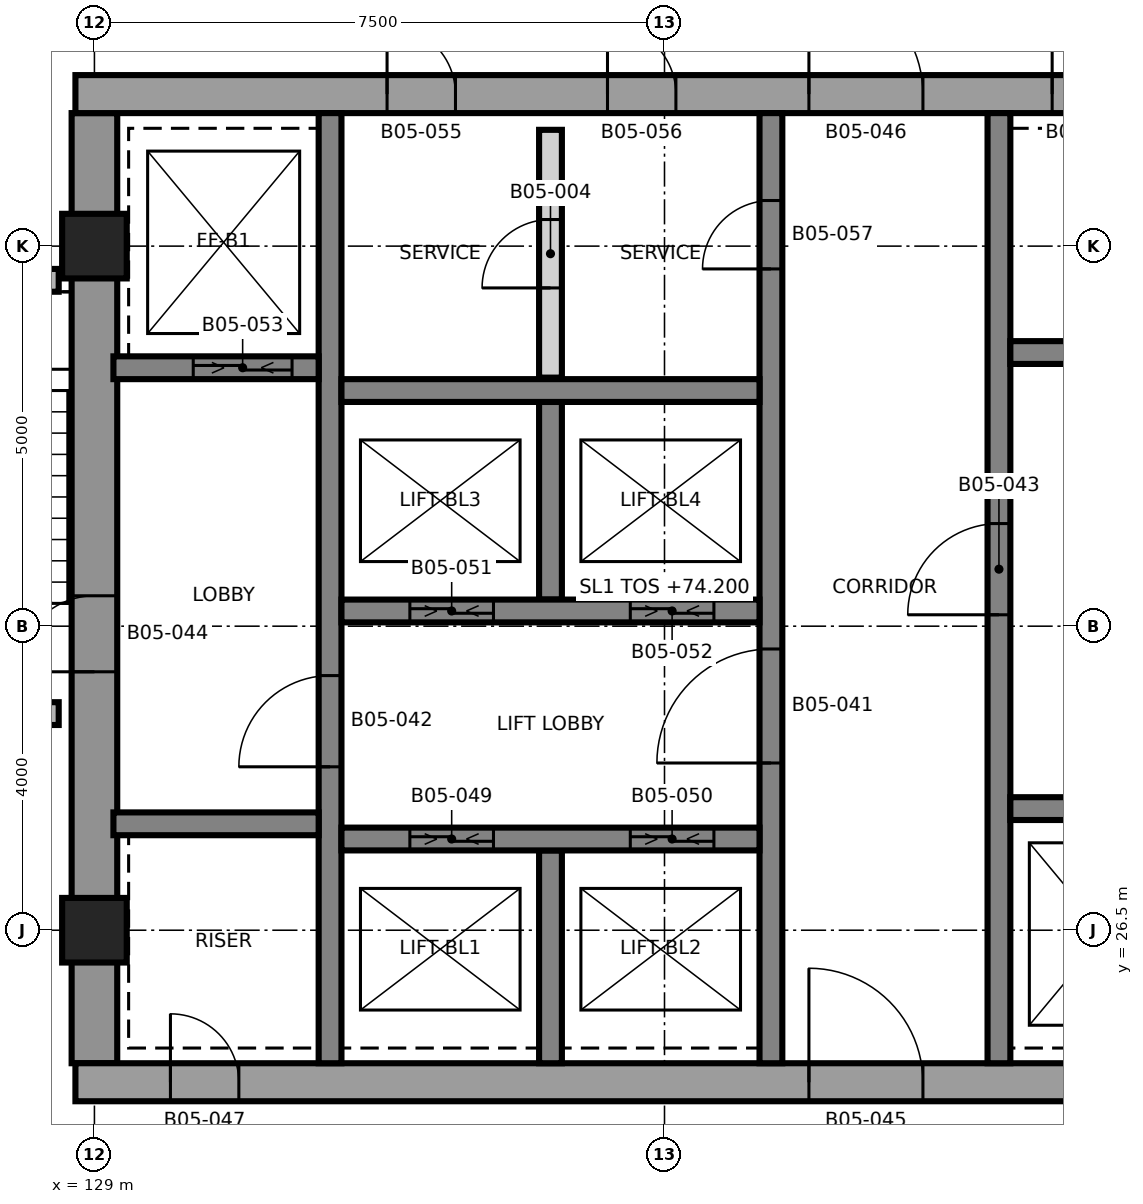
"""IFC4 building model, lengths in metres.
Left out: names, types, materials, properties, quantities, classifications, styles, units other than length and angle.
Written with IfcOpenShell. Run it as: python <this file> out.ifc"""

import sys

from ifc_helpers import new_model, si_unit, direction, frame, frame_2d, origin, origin_2d, place, context, subcontext, project, spatial, rectangle, extrude, element, fill, save


model = new_model("IFC4")
c1 = context("Model", 3, precision=1e-05, world=origin(), true_north=direction((0.0, 1.0)))
c2 = subcontext(c1, "Body", "Model", "MODEL_VIEW")
j1 = project(units=[si_unit("LENGTHUNIT", "METRE"), si_unit("PLANEANGLEUNIT", "RADIAN")], contexts=[c1])
p1 = place(None, origin())
s1 = spatial("IfcSite", under=j1, at=p1, CompositionType="ELEMENT")
p2 = place(p1, origin())
s2 = spatial("IfcBuilding", under=s1, at=p2, CompositionType="ELEMENT")
p3 = place(p2, frame((0.0, 0.0, 74.2)))
s3 = spatial("IfcBuildingStorey", under=s2, at=p3, CompositionType="ELEMENT", Elevation=74.2)
p4 = place(p3, frame((129.0, 24.75, 0.0), z_axis=(0.0, 0.0, 1.0), x_axis=(0.0, 1.0, 0.0)))
e1 = element("IfcWall", 1, at=p4, inside=s3, PredefinedType="SHEAR", context=c2, shape_type="SweptSolid", body=[
    extrude(rectangle(XDim=12.5, YDim=0.6, at=frame_2d((6.25, 0.0))), origin(), (0.0, 0.0, 1.0), 3.7),
])
p5 = place(p4, frame((5.15, 0.0, 0.0)))
e2 = element("IfcOpeningElement", 2, at=p5, cuts=e1, PredefinedType="OPENING", context=c2, shape_type="SweptSolid", body=[
    extrude(rectangle(XDim=1.0, YDim=2.1, at=frame_2d((0.5, 1.05))), frame((0.0, 0.31, 0.0), z_axis=(0.0, -1.0, 0.0), x_axis=(1.0, 0.0, 0.0)), (0.0, 0.0, 1.0), 0.62),
])
p6 = place(p3, frame((128.75, 24.5, 0.0), z_axis=(0.0, 0.0, 1.0), x_axis=(1.0, 0.0, 0.0)))
e3 = element("IfcWall", 3, at=p6, inside=s3, PredefinedType="SHEAR", context=c2, shape_type="SweptSolid", body=[
    extrude(rectangle(XDim=15.0, YDim=0.5, at=frame_2d((7.5, 0.0))), origin(), (0.0, 0.0, 1.0), 3.7),
])
p7 = place(p6, frame((9.65, 0.0, 0.0)))
e4 = element("IfcOpeningElement", 4, at=p7, cuts=e3, PredefinedType="OPENING", context=c2, shape_type="SweptSolid", body=[
    extrude(rectangle(XDim=1.5, YDim=2.1, at=frame_2d((0.75, 1.05))), frame((0.0, 0.26, 0.0), z_axis=(0.0, -1.0, 0.0), x_axis=(1.0, 0.0, 0.0)), (0.0, 0.0, 1.0), 0.52),
])
p8 = place(p6, frame((1.25, 0.0, 0.0)))
e5 = element("IfcOpeningElement", 5, at=p8, cuts=e3, PredefinedType="OPENING", context=c2, shape_type="SweptSolid", body=[
    extrude(rectangle(XDim=0.9, YDim=2.1, at=frame_2d((0.45, 1.05))), frame((0.0, 0.26, 0.0), z_axis=(0.0, -1.0, 0.0), x_axis=(1.0, 0.0, 0.0)), (0.0, 0.0, 1.0), 0.52),
])
p9 = place(p3, frame((128.75, 37.5, 0.0), z_axis=(0.0, 0.0, 1.0), x_axis=(1.0, 0.0, 0.0)))
e6 = element("IfcWall", 6, at=p9, inside=s3, PredefinedType="SHEAR", context=c2, shape_type="SweptSolid", body=[
    extrude(rectangle(XDim=15.0, YDim=0.5, at=frame_2d((7.5, 0.0))), origin(), (0.0, 0.0, 1.0), 3.7),
])
p10 = place(p9, frame((9.65, 0.0, 0.0)))
e7 = element("IfcOpeningElement", 7, at=p10, cuts=e6, PredefinedType="OPENING", context=c2, shape_type="SweptSolid", body=[
    extrude(rectangle(XDim=1.5, YDim=2.1, at=frame_2d((0.75, 1.05))), frame((0.0, 0.26, 0.0), z_axis=(0.0, -1.0, 0.0), x_axis=(1.0, 0.0, 0.0)), (0.0, 0.0, 1.0), 0.52),
])
p11 = place(p9, frame((12.85, 0.0, 0.0)))
e8 = element("IfcOpeningElement", 8, at=p11, cuts=e6, PredefinedType="OPENING", context=c2, shape_type="SweptSolid", body=[
    extrude(rectangle(XDim=0.9, YDim=2.1, at=frame_2d((0.45, 1.05))), frame((0.0, 0.26, 0.0), z_axis=(0.0, -1.0, 0.0), x_axis=(1.0, 0.0, 0.0)), (0.0, 0.0, 1.0), 0.52),
])
p12 = place(p9, frame((4.1, 0.0, 0.0)))
e9 = element("IfcOpeningElement", 9, at=p12, cuts=e6, PredefinedType="OPENING", context=c2, shape_type="SweptSolid", body=[
    extrude(rectangle(XDim=0.9, YDim=2.1, at=frame_2d((0.45, 1.05))), frame((0.0, 0.26, 0.0), z_axis=(0.0, -1.0, 0.0), x_axis=(1.0, 0.0, 0.0)), (0.0, 0.0, 1.0), 0.52),
])
p13 = place(p9, frame((7.0, 0.0, 0.0)))
e10 = element("IfcOpeningElement", 10, at=p13, cuts=e6, PredefinedType="OPENING", context=c2, shape_type="SweptSolid", body=[
    extrude(rectangle(XDim=0.9, YDim=2.1, at=frame_2d((0.45, 1.05))), frame((0.0, 0.26, 0.0), z_axis=(0.0, -1.0, 0.0), x_axis=(1.0, 0.0, 0.0)), (0.0, 0.0, 1.0), 0.52),
])
p14 = place(p3, frame((132.1, 24.75, 0.0), z_axis=(0.0, 0.0, 1.0), x_axis=(0.0, 1.0, 0.0)))
e11 = element("IfcWall", 11, at=p14, inside=s3, PredefinedType="SHEAR", context=c2, shape_type="SweptSolid", body=[
    extrude(rectangle(XDim=12.5, YDim=0.3, at=frame_2d((6.25, 0.0))), origin(), (0.0, 0.0, 1.0), 3.7),
])
p15 = place(p14, frame((3.9, 0.0, 0.0)))
e12 = element("IfcOpeningElement", 12, at=p15, cuts=e11, PredefinedType="OPENING", context=c2, shape_type="SweptSolid", body=[
    extrude(rectangle(XDim=1.2, YDim=2.1, at=frame_2d((0.6, 1.05))), frame((0.0, 0.16, 0.0), z_axis=(0.0, -1.0, 0.0), x_axis=(1.0, 0.0, 0.0)), (0.0, 0.0, 1.0), 0.32),
])
p16 = place(p3, frame((137.9, 24.75, 0.0), z_axis=(0.0, 0.0, 1.0), x_axis=(0.0, 1.0, 0.0)))
e13 = element("IfcWall", 13, at=p16, inside=s3, PredefinedType="SHEAR", context=c2, shape_type="SweptSolid", body=[
    extrude(rectangle(XDim=12.5, YDim=0.3, at=frame_2d((6.25, 0.0))), origin(), (0.0, 0.0, 1.0), 3.7),
])
p17 = place(p16, frame((3.95, 0.0, 0.0)))
e14 = element("IfcOpeningElement", 14, at=p17, cuts=e13, PredefinedType="OPENING", context=c2, shape_type="SweptSolid", body=[
    extrude(rectangle(XDim=1.5, YDim=2.1, at=frame_2d((0.75, 1.05))), frame((0.0, 0.16, 0.0), z_axis=(0.0, -1.0, 0.0), x_axis=(1.0, 0.0, 0.0)), (0.0, 0.0, 1.0), 0.32),
])
p18 = place(p16, frame((10.45, 0.0, 0.0)))
e15 = element("IfcOpeningElement", 15, at=p18, cuts=e13, PredefinedType="OPENING", context=c2, shape_type="SweptSolid", body=[
    extrude(rectangle(XDim=0.9, YDim=2.1, at=frame_2d((0.45, 1.05))), frame((0.0, 0.16, 0.0), z_axis=(0.0, -1.0, 0.0), x_axis=(1.0, 0.0, 0.0)), (0.0, 0.0, 1.0), 0.32),
])
p19 = place(p3, frame((140.9, 24.75, 0.0), z_axis=(0.0, 0.0, 1.0), x_axis=(0.0, 1.0, 0.0)))
e16 = element("IfcWall", 16, at=p19, inside=s3, PredefinedType="SHEAR", context=c2, shape_type="SweptSolid", body=[
    extrude(rectangle(XDim=12.5, YDim=0.3, at=frame_2d((6.25, 0.0))), origin(), (0.0, 0.0, 1.0), 3.7),
])
p20 = place(p19, frame((5.9, 0.0, 0.0)))
e17 = element("IfcOpeningElement", 17, at=p20, cuts=e16, PredefinedType="OPENING", context=c2, shape_type="SweptSolid", body=[
    extrude(rectangle(XDim=1.2, YDim=2.1, at=frame_2d((0.6, 1.05))), frame((0.0, 0.16, 0.0), z_axis=(0.0, -1.0, 0.0), x_axis=(1.0, 0.0, 0.0)), (0.0, 0.0, 1.0), 0.32),
])
p21 = place(p3, frame((135.0, 24.75, 0.0), z_axis=(0.0, 0.0, 1.0), x_axis=(0.0, 1.0, 0.0)))
e18 = element("IfcWall", 18, at=p21, inside=s3, PredefinedType="SHEAR", context=c2, shape_type="SweptSolid", body=[
    extrude(rectangle(XDim=2.8, YDim=0.3, at=frame_2d((1.4, 0.0))), origin(), (0.0, 0.0, 1.0), 3.7),
])
p22 = place(p3, frame((135.0, 30.85, 0.0), z_axis=(0.0, 0.0, 1.0), x_axis=(0.0, 1.0, 0.0)))
e19 = element("IfcWall", 19, at=p22, inside=s3, PredefinedType="SHEAR", context=c2, shape_type="SweptSolid", body=[
    extrude(rectangle(XDim=2.6, YDim=0.3, at=frame_2d((1.3, 0.0))), origin(), (0.0, 0.0, 1.0), 3.7),
])
p23 = place(p3, frame((132.25, 27.7, 0.0), z_axis=(0.0, 0.0, 1.0), x_axis=(1.0, 0.0, 0.0)))
e20 = element("IfcWall", 20, at=p23, inside=s3, PredefinedType="SHEAR", context=c2, shape_type="SweptSolid", body=[
    extrude(rectangle(XDim=5.5, YDim=0.3, at=frame_2d((2.75, 0.0))), origin(), (0.0, 0.0, 1.0), 3.7),
])
p24 = place(p23, frame((0.9, 0.0, 0.0)))
e21 = element("IfcOpeningElement", 21, at=p24, cuts=e20, PredefinedType="OPENING", context=c2, shape_type="SweptSolid", body=[
    extrude(rectangle(XDim=1.1, YDim=2.4, at=frame_2d((0.55, 1.2))), frame((0.0, 0.16, 0.0), z_axis=(0.0, -1.0, 0.0), x_axis=(1.0, 0.0, 0.0)), (0.0, 0.0, 1.0), 0.32),
])
p25 = place(p23, frame((3.8, 0.0, 0.0)))
e22 = element("IfcOpeningElement", 22, at=p25, cuts=e20, PredefinedType="OPENING", context=c2, shape_type="SweptSolid", body=[
    extrude(rectangle(XDim=1.1, YDim=2.4, at=frame_2d((0.55, 1.2))), frame((0.0, 0.16, 0.0), z_axis=(0.0, -1.0, 0.0), x_axis=(1.0, 0.0, 0.0)), (0.0, 0.0, 1.0), 0.32),
])
p26 = place(p3, frame((132.25, 30.7, 0.0), z_axis=(0.0, 0.0, 1.0), x_axis=(1.0, 0.0, 0.0)))
e23 = element("IfcWall", 23, at=p26, inside=s3, PredefinedType="SHEAR", context=c2, shape_type="SweptSolid", body=[
    extrude(rectangle(XDim=5.5, YDim=0.3, at=frame_2d((2.75, 0.0))), origin(), (0.0, 0.0, 1.0), 3.7),
])
p27 = place(p26, frame((0.9, 0.0, 0.0)))
e24 = element("IfcOpeningElement", 24, at=p27, cuts=e23, PredefinedType="OPENING", context=c2, shape_type="SweptSolid", body=[
    extrude(rectangle(XDim=1.1, YDim=2.4, at=frame_2d((0.55, 1.2))), frame((0.0, 0.16, 0.0), z_axis=(0.0, -1.0, 0.0), x_axis=(1.0, 0.0, 0.0)), (0.0, 0.0, 1.0), 0.32),
])
p28 = place(p26, frame((3.8, 0.0, 0.0)))
e25 = element("IfcOpeningElement", 25, at=p28, cuts=e23, PredefinedType="OPENING", context=c2, shape_type="SweptSolid", body=[
    extrude(rectangle(XDim=1.1, YDim=2.4, at=frame_2d((0.55, 1.2))), frame((0.0, 0.16, 0.0), z_axis=(0.0, -1.0, 0.0), x_axis=(1.0, 0.0, 0.0)), (0.0, 0.0, 1.0), 0.32),
])
p29 = place(p3, frame((132.25, 33.6, 0.0), z_axis=(0.0, 0.0, 1.0), x_axis=(1.0, 0.0, 0.0)))
e26 = element("IfcWall", 26, at=p29, inside=s3, PredefinedType="SHEAR", context=c2, shape_type="SweptSolid", body=[
    extrude(rectangle(XDim=5.5, YDim=0.3, at=frame_2d((2.75, 0.0))), origin(), (0.0, 0.0, 1.0), 3.7),
])
p30 = place(p3, frame((129.25, 27.9, 0.0), z_axis=(0.0, 0.0, 1.0), x_axis=(1.0, 0.0, 0.0)))
e27 = element("IfcWall", 27, at=p30, inside=s3, PredefinedType="SHEAR", context=c2, shape_type="SweptSolid", body=[
    extrude(rectangle(XDim=2.7, YDim=0.3, at=frame_2d((1.35, 0.0))), origin(), (0.0, 0.0, 1.0), 3.7),
])
p31 = place(p3, frame((129.25, 33.9, 0.0), z_axis=(0.0, 0.0, 1.0), x_axis=(1.0, 0.0, 0.0)))
e28 = element("IfcWall", 28, at=p31, inside=s3, PredefinedType="SHEAR", context=c2, shape_type="SweptSolid", body=[
    extrude(rectangle(XDim=2.7, YDim=0.3, at=frame_2d((1.35, 0.0))), origin(), (0.0, 0.0, 1.0), 3.7),
])
p32 = place(p31, frame((1.05, 0.0, 0.0)))
e29 = element("IfcOpeningElement", 29, at=p32, cuts=e28, PredefinedType="OPENING", context=c2, shape_type="SweptSolid", body=[
    extrude(rectangle(XDim=1.3, YDim=2.4, at=frame_2d((0.65, 1.2))), frame((0.0, 0.16, 0.0), z_axis=(0.0, -1.0, 0.0), x_axis=(1.0, 0.0, 0.0)), (0.0, 0.0, 1.0), 0.32),
])
p33 = place(p3, frame((141.05, 28.1, 0.0), z_axis=(0.0, 0.0, 1.0), x_axis=(1.0, 0.0, 0.0)))
e30 = element("IfcWall", 30, at=p33, inside=s3, PredefinedType="SHEAR", context=c2, shape_type="SweptSolid", body=[
    extrude(rectangle(XDim=2.7, YDim=0.3, at=frame_2d((1.35, 0.0))), origin(), (0.0, 0.0, 1.0), 3.7),
])
p34 = place(p33, frame((0.75, 0.0, 0.0)))
e31 = element("IfcOpeningElement", 31, at=p34, cuts=e30, PredefinedType="OPENING", context=c2, shape_type="SweptSolid", body=[
    extrude(rectangle(XDim=1.3, YDim=2.4, at=frame_2d((0.65, 1.2))), frame((0.0, 0.16, 0.0), z_axis=(0.0, -1.0, 0.0), x_axis=(1.0, 0.0, 0.0)), (0.0, 0.0, 1.0), 0.32),
])
p35 = place(p3, frame((141.05, 34.1, 0.0), z_axis=(0.0, 0.0, 1.0), x_axis=(1.0, 0.0, 0.0)))
e32 = element("IfcWall", 32, at=p35, inside=s3, PredefinedType="SHEAR", context=c2, shape_type="SweptSolid", body=[
    extrude(rectangle(XDim=2.7, YDim=0.3, at=frame_2d((1.35, 0.0))), origin(), (0.0, 0.0, 1.0), 3.7),
])
for number, where, z_axis, x_axis in (
    (33, (129.0, 26.5, 0.0), (0.0, 0.0, 1.0), (1.0, 0.0, 0.0)),
    (34, (129.0, 35.5, 0.0), (0.0, 0.0, 1.0), (1.0, 0.0, 0.0)),
):
    element("IfcColumn", number, at=place(p3, frame(where, z_axis=z_axis, x_axis=x_axis)), inside=s3, PredefinedType="COLUMN", context=c2, shape_type="SweptSolid", body=[
        extrude(rectangle(XDim=0.85, YDim=0.85, at=origin_2d()), origin(), (0.0, 0.0, 1.0), 3.7),
    ])
p36 = place(p3, frame((125.7, 29.35, 0.0), z_axis=(0.0, 0.0, 1.0), x_axis=(1.0, 0.0, 0.0)))
e35 = element("IfcWall", 35, at=p36, inside=s3, PredefinedType="SHEAR", context=c2, shape_type="SweptSolid", body=[
    extrude(rectangle(XDim=2.83, YDim=0.3, at=frame_2d((1.415, 0.0))), origin(), (0.0, 0.0, 1.0), 3.4),
])
p37 = place(p36, frame((0.975, 0.0, 0.0)))
e36 = element("IfcOpeningElement", 36, at=p37, cuts=e35, PredefinedType="OPENING", context=c2, shape_type="SweptSolid", body=[
    extrude(rectangle(XDim=1.2, YDim=2.1, at=frame_2d((0.6, 1.05))), frame((0.0, 0.16, 0.0), z_axis=(0.0, -1.0, 0.0), x_axis=(1.0, 0.0, 0.0)), (0.0, 0.0, 1.0), 0.32),
])
p38 = place(p3, frame((125.7, 35.05, 0.0), z_axis=(0.0, 0.0, 1.0), x_axis=(1.0, 0.0, 0.0)))
e37 = element("IfcWall", 37, at=p38, inside=s3, PredefinedType="SHEAR", context=c2, shape_type="SweptSolid", body=[
    extrude(rectangle(XDim=2.83, YDim=0.3, at=frame_2d((1.415, 0.0))), origin(), (0.0, 0.0, 1.0), 3.4),
])
p39 = place(p3, frame((135.0, 33.77, 0.0), z_axis=(0.0, 0.0, 1.0), x_axis=(0.0, 1.0, 0.0)))
e38 = element("IfcWall", 38, at=p39, inside=s3, PredefinedType="PARTITIONING", context=c2, shape_type="SweptSolid", body=[
    extrude(rectangle(XDim=3.26, YDim=0.3, at=frame_2d((1.63, 0.0))), origin(), (0.0, 0.0, 1.0), 3.4),
])
p40 = place(p39, frame((1.18, 0.0, 0.0)))
e39 = element("IfcOpeningElement", 39, at=p40, cuts=e38, PredefinedType="OPENING", context=c2, shape_type="SweptSolid", body=[
    extrude(rectangle(XDim=0.9, YDim=2.1, at=frame_2d((0.45, 1.05))), frame((0.0, 0.16, 0.0), z_axis=(0.0, -1.0, 0.0), x_axis=(1.0, 0.0, 0.0)), (0.0, 0.0, 1.0), 0.32),
])
p41 = place(p40, origin())
e40 = element("IfcDoor", 40, at=p41, inside=s3, OperationType="SINGLE_SWING_RIGHT", PredefinedType="DOOR", context=c2, shape_type="SweptSolid", body=[
    extrude(rectangle(XDim=0.9, YDim=2.1, at=frame_2d((0.45, 1.05))), frame((0.0, 0.025, 0.0), z_axis=(0.0, -1.0, 0.0), x_axis=(1.0, 0.0, 0.0)), (0.0, 0.0, 1.0), 0.05),
])
fill(e39, e40)
p42 = place(p17, origin())
e41 = element("IfcDoor", 41, at=p42, inside=s3, OperationType="SINGLE_SWING_RIGHT", PredefinedType="DOOR", context=c2, shape_type="SweptSolid", body=[
    extrude(rectangle(XDim=1.5, YDim=2.1, at=frame_2d((0.75, 1.05))), frame((0.0, 0.025, 0.0), z_axis=(0.0, -1.0, 0.0), x_axis=(1.0, 0.0, 0.0)), (0.0, 0.0, 1.0), 0.05),
])
fill(e14, e41)
p43 = place(p15, origin())
e42 = element("IfcDoor", 42, at=p43, inside=s3, OperationType="SINGLE_SWING_LEFT", PredefinedType="DOOR", context=c2, shape_type="SweptSolid", body=[
    extrude(rectangle(XDim=1.2, YDim=2.1, at=frame_2d((0.6, 1.05))), frame((0.0, 0.025, 0.0), z_axis=(0.0, -1.0, 0.0), x_axis=(1.0, 0.0, 0.0)), (0.0, 0.0, 1.0), 0.05),
])
fill(e12, e42)
p44 = place(p20, origin())
e43 = element("IfcDoor", 43, at=p44, inside=s3, OperationType="SINGLE_SWING_RIGHT", PredefinedType="DOOR", context=c2, shape_type="SweptSolid", body=[
    extrude(rectangle(XDim=1.2, YDim=2.1, at=frame_2d((0.6, 1.05))), frame((0.0, 0.025, 0.0), z_axis=(0.0, -1.0, 0.0), x_axis=(1.0, 0.0, 0.0)), (0.0, 0.0, 1.0), 0.05),
])
fill(e17, e43)
p45 = place(p5, origin())
e44 = element("IfcDoor", 44, at=p45, inside=s3, OperationType="SINGLE_SWING_RIGHT", PredefinedType="DOOR", context=c2, shape_type="SweptSolid", body=[
    extrude(rectangle(XDim=1.0, YDim=2.1, at=frame_2d((0.5, 1.05))), frame((0.0, 0.025, 0.0), z_axis=(0.0, -1.0, 0.0), x_axis=(1.0, 0.0, 0.0)), (0.0, 0.0, 1.0), 0.05),
])
fill(e2, e44)
p46 = place(p7, origin())
e45 = element("IfcDoor", 45, at=p46, inside=s3, OperationType="SINGLE_SWING_LEFT", PredefinedType="DOOR", context=c2, shape_type="SweptSolid", body=[
    extrude(rectangle(XDim=1.5, YDim=2.1, at=frame_2d((0.75, 1.05))), frame((0.0, 0.025, 0.0), z_axis=(0.0, -1.0, 0.0), x_axis=(1.0, 0.0, 0.0)), (0.0, 0.0, 1.0), 0.05),
])
fill(e4, e45)
p47 = place(p10, origin())
e46 = element("IfcDoor", 46, at=p47, inside=s3, OperationType="SINGLE_SWING_RIGHT", PredefinedType="DOOR", context=c2, shape_type="SweptSolid", body=[
    extrude(rectangle(XDim=1.5, YDim=2.1, at=frame_2d((0.75, 1.05))), frame((0.0, 0.025, 0.0), z_axis=(0.0, -1.0, 0.0), x_axis=(1.0, 0.0, 0.0)), (0.0, 0.0, 1.0), 0.05),
])
fill(e7, e46)
p48 = place(p8, origin())
e47 = element("IfcDoor", 47, at=p48, inside=s3, OperationType="SINGLE_SWING_LEFT", PredefinedType="DOOR", context=c2, shape_type="SweptSolid", body=[
    extrude(rectangle(XDim=0.9, YDim=2.1, at=frame_2d((0.45, 1.05))), frame((0.0, 0.025, 0.0), z_axis=(0.0, -1.0, 0.0), x_axis=(1.0, 0.0, 0.0)), (0.0, 0.0, 1.0), 0.05),
])
fill(e5, e47)
p49 = place(p11, origin())
e48 = element("IfcDoor", 48, at=p49, inside=s3, OperationType="SINGLE_SWING_RIGHT", PredefinedType="DOOR", context=c2, shape_type="SweptSolid", body=[
    extrude(rectangle(XDim=0.9, YDim=2.1, at=frame_2d((0.45, 1.05))), frame((0.0, 0.025, 0.0), z_axis=(0.0, -1.0, 0.0), x_axis=(1.0, 0.0, 0.0)), (0.0, 0.0, 1.0), 0.05),
])
fill(e8, e48)
p50 = place(p24, origin())
e49 = element("IfcDoor", 49, at=p50, inside=s3, OperationType="SLIDING_TO_LEFT", PredefinedType="DOOR", context=c2, shape_type="SweptSolid", body=[
    extrude(rectangle(XDim=1.1, YDim=2.4, at=frame_2d((0.55, 1.2))), frame((0.0, 0.025, 0.0), z_axis=(0.0, -1.0, 0.0), x_axis=(1.0, 0.0, 0.0)), (0.0, 0.0, 1.0), 0.05),
])
fill(e21, e49)
p51 = place(p25, origin())
e50 = element("IfcDoor", 50, at=p51, inside=s3, OperationType="SLIDING_TO_LEFT", PredefinedType="DOOR", context=c2, shape_type="SweptSolid", body=[
    extrude(rectangle(XDim=1.1, YDim=2.4, at=frame_2d((0.55, 1.2))), frame((0.0, 0.025, 0.0), z_axis=(0.0, -1.0, 0.0), x_axis=(1.0, 0.0, 0.0)), (0.0, 0.0, 1.0), 0.05),
])
fill(e22, e50)
p52 = place(p27, origin())
e51 = element("IfcDoor", 51, at=p52, inside=s3, OperationType="SLIDING_TO_LEFT", PredefinedType="DOOR", context=c2, shape_type="SweptSolid", body=[
    extrude(rectangle(XDim=1.1, YDim=2.4, at=frame_2d((0.55, 1.2))), frame((0.0, 0.025, 0.0), z_axis=(0.0, -1.0, 0.0), x_axis=(1.0, 0.0, 0.0)), (0.0, 0.0, 1.0), 0.05),
])
fill(e24, e51)
p53 = place(p28, origin())
e52 = element("IfcDoor", 52, at=p53, inside=s3, OperationType="SLIDING_TO_LEFT", PredefinedType="DOOR", context=c2, shape_type="SweptSolid", body=[
    extrude(rectangle(XDim=1.1, YDim=2.4, at=frame_2d((0.55, 1.2))), frame((0.0, 0.025, 0.0), z_axis=(0.0, -1.0, 0.0), x_axis=(1.0, 0.0, 0.0)), (0.0, 0.0, 1.0), 0.05),
])
fill(e25, e52)
p54 = place(p32, origin())
e53 = element("IfcDoor", 53, at=p54, inside=s3, OperationType="SLIDING_TO_LEFT", PredefinedType="DOOR", context=c2, shape_type="SweptSolid", body=[
    extrude(rectangle(XDim=1.3, YDim=2.4, at=frame_2d((0.65, 1.2))), frame((0.0, 0.025, 0.0), z_axis=(0.0, -1.0, 0.0), x_axis=(1.0, 0.0, 0.0)), (0.0, 0.0, 1.0), 0.05),
])
fill(e29, e53)
p55 = place(p12, origin())
e54 = element("IfcDoor", 54, at=p55, inside=s3, OperationType="SINGLE_SWING_LEFT", PredefinedType="DOOR", context=c2, shape_type="SweptSolid", body=[
    extrude(rectangle(XDim=0.9, YDim=2.1, at=frame_2d((0.45, 1.05))), frame((0.0, 0.025, 0.0), z_axis=(0.0, -1.0, 0.0), x_axis=(1.0, 0.0, 0.0)), (0.0, 0.0, 1.0), 0.05),
])
fill(e9, e54)
p56 = place(p13, origin())
e55 = element("IfcDoor", 55, at=p56, inside=s3, OperationType="SINGLE_SWING_RIGHT", PredefinedType="DOOR", context=c2, shape_type="SweptSolid", body=[
    extrude(rectangle(XDim=0.9, YDim=2.1, at=frame_2d((0.45, 1.05))), frame((0.0, 0.025, 0.0), z_axis=(0.0, -1.0, 0.0), x_axis=(1.0, 0.0, 0.0)), (0.0, 0.0, 1.0), 0.05),
])
fill(e10, e55)
p57 = place(p18, origin())
e56 = element("IfcDoor", 56, at=p57, inside=s3, OperationType="SINGLE_SWING_RIGHT", PredefinedType="DOOR", context=c2, shape_type="SweptSolid", body=[
    extrude(rectangle(XDim=0.9, YDim=2.1, at=frame_2d((0.45, 1.05))), frame((0.0, 0.025, 0.0), z_axis=(0.0, -1.0, 0.0), x_axis=(1.0, 0.0, 0.0)), (0.0, 0.0, 1.0), 0.05),
])
fill(e15, e56)
save(model, sys.argv[1])
